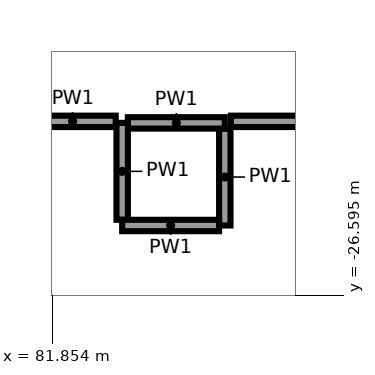
"""IFC4 building model, lengths in metres.
Left out: names, types, materials, properties, quantities, classifications, styles, units other than length and angle.
Written with IfcOpenShell. Run it as: python <this file> out.ifc"""

import sys

from ifc_helpers import new_model, si_unit, direction, frame, frame_2d, origin, place, context, subcontext, project, spatial, rectangle, extrude, element, save


model = new_model("IFC4")
c1 = context("Model", 3, precision=1e-05, world=origin(), true_north=direction((0.0, 1.0)))
c2 = subcontext(c1, "Body", "Model", "MODEL_VIEW")
j1 = project(units=[si_unit("LENGTHUNIT", "METRE"), si_unit("PLANEANGLEUNIT", "RADIAN")], contexts=[c1])
p1 = place(None, origin())
s1 = spatial("IfcSite", under=j1, at=p1, CompositionType="ELEMENT")
p2 = place(p1, origin())
s2 = spatial("IfcBuilding", under=s1, at=p2, CompositionType="ELEMENT")
p3 = place(p2, frame((0.0, 0.0, 6.5)))
s3 = spatial("IfcBuildingStorey", under=s2, at=p3, CompositionType="ELEMENT", Elevation=6.5)
p4 = place(p3, frame((84.125, -25.675, 0.0), z_axis=(0.0, 0.0, 1.0), x_axis=(0.0, 1.0, 0.0)))
e1 = element("IfcWall", 1, at=p4, inside=s3, PredefinedType="PARTITIONING", context=c2, shape_type="SweptSolid", body=[
    extrude(rectangle(XDim=1.275, YDim=0.15, at=frame_2d((0.638, 0.0))), origin(), (0.0, 0.0, 1.0), 5.15),
])
p5 = place(p3, frame((84.125, -24.325, 0.0), z_axis=(0.0, 0.0, 1.0), x_axis=(-1.0, 0.0, 0.0)))
e2 = element("IfcWall", 2, at=p5, inside=s3, PredefinedType="PARTITIONING", context=c2, shape_type="SweptSolid", body=[
    extrude(rectangle(XDim=1.275, YDim=0.15, at=frame_2d((0.637, 0.0))), origin(), (0.0, 0.0, 1.0), 5.15),
])
for number, where, z_axis, x_axis in (
    (3, (82.775, -24.325, 0.0), (0.0, 0.0, 1.0), (0.0, -1.0, 0.0)),
    (4, (82.775, -25.675, 0.0), (0.0, 0.0, 1.0), (1.0, 0.0, 0.0)),
):
    element("IfcWall", number, at=place(p3, frame(where, z_axis=z_axis, x_axis=x_axis)), inside=s3, PredefinedType="PARTITIONING", context=c2, shape_type="SweptSolid", body=[
        extrude(rectangle(XDim=1.275, YDim=0.15, at=frame_2d((0.638, 0.0))), origin(), (0.0, 0.0, 1.0), 5.15),
    ])
p6 = place(p3, frame((82.69, -24.305, 0.0), z_axis=(0.0, 0.0, 1.0), x_axis=(-1.0, 0.0, 0.0)))
e5 = element("IfcWall", 5, at=p6, inside=s3, PredefinedType="PARTITIONING", context=c2, shape_type="SweptSolid", body=[
    extrude(rectangle(XDim=1.135, YDim=0.15, at=frame_2d((0.567, 0.0))), origin(), (0.0, 0.0, 1.0), 5.15),
])
p7 = place(p3, frame((87.909, -24.305, 0.0), z_axis=(0.0, 0.0, 1.0), x_axis=(-1.0, 0.0, 0.0)))
e6 = element("IfcWall", 6, at=p7, inside=s3, PredefinedType="PARTITIONING", context=c2, shape_type="SweptSolid", body=[
    extrude(rectangle(XDim=3.704, YDim=0.15, at=frame_2d((1.852, 0.0))), origin(), (0.0, 0.0, 1.0), 4.05),
])
p8 = place(p7, frame((0.65, 0.0, 0.0)))
e7 = element("IfcOpeningElement", 7, at=p8, cuts=e6, PredefinedType="OPENING", context=c2, shape_type="SweptSolid", body=[
    extrude(rectangle(XDim=1.8, YDim=2.1, at=frame_2d((0.9, 1.05))), frame((0.0, 0.085, 0.0), z_axis=(0.0, -1.0, 0.0), x_axis=(1.0, 0.0, 0.0)), (0.0, 0.0, 1.0), 0.17),
])
save(model, sys.argv[1])
